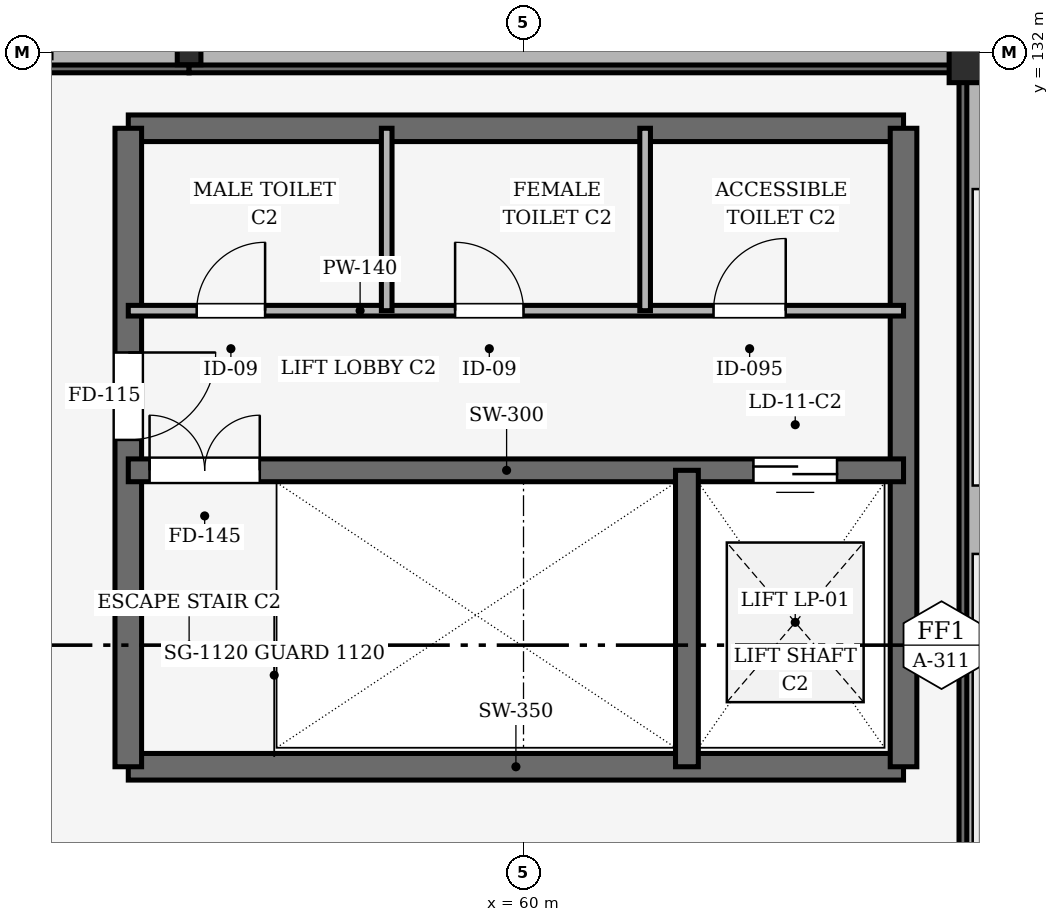
"""IFC4 building model, lengths in metres.
Left out: names, types, materials, properties, quantities, classifications, styles, units other than length and angle.
Written with IfcOpenShell. Run it as: python <this file> out.ifc"""

import sys

from ifc_helpers import new_model, si_unit, direction, frame, frame_2d, origin, origin_2d, place, context, subcontext, project, spatial, rectangle, i_section, extrude, element, fill, save


model = new_model("IFC4")
c1 = context("Model", 3, precision=1e-05, world=origin(), true_north=direction((0.0, 1.0)))
c2 = subcontext(c1, "Body", "Model", "MODEL_VIEW")
j1 = project(units=[si_unit("LENGTHUNIT", "METRE"), si_unit("PLANEANGLEUNIT", "RADIAN")], contexts=[c1])
p1 = place(None, origin())
s1 = spatial("IfcSite", under=j1, at=p1, CompositionType="ELEMENT")
p2 = place(p1, origin())
s2 = spatial("IfcBuilding", under=s1, at=p2, CompositionType="ELEMENT")
p3 = place(p2, frame((0.0, 0.0, 10.8)))
s3 = spatial("IfcBuildingStorey", under=s2, at=p3, CompositionType="ELEMENT", Elevation=10.8)
p4 = place(p3, frame((66.0, 132.0, 0.0), z_axis=(0.0, 0.0, 1.0), x_axis=(1.0, 0.0, 0.0)))
e1 = element("IfcColumn", 1, at=p4, inside=s3, PredefinedType="COLUMN", context=c2, shape_type="SweptSolid", body=[
    extrude(rectangle(XDim=0.8, YDim=0.8, at=origin_2d()), origin(), (0.0, 0.0, 1.0), 8.5),
])
p5 = place(p3, frame((55.6, 132.0, 0.0), z_axis=(0.0, 0.0, 1.0), x_axis=(1.0, 0.0, 0.0)))
e2 = element("IfcColumn", 2, at=p5, inside=s3, PredefinedType="COLUMN", context=c2, shape_type="SweptSolid", body=[
    extrude(i_section(OverallWidth=0.311, OverallDepth=0.327, WebThickness=0.016, FlangeThickness=0.025, FilletRadius=0.015, at=origin_2d()), origin(), (0.0, 0.0, 1.0), 6.7),
])
p6 = place(p3, frame((66.0, 120.0, 0.0), z_axis=(0.0, 0.0, 1.0), x_axis=(0.0, 1.0, 0.0)))
e3 = element("IfcWall", 3, at=p6, inside=s3, PredefinedType="SOLIDWALL", context=c2, shape_type="SweptSolid", body=[
    extrude(rectangle(XDim=12.0, YDim=0.54, at=frame_2d((6.0, 0.0))), origin(), (0.0, 0.0, 1.0), 4.6),
])
p7 = place(p3, frame((55.6, 132.0, 0.0), z_axis=(0.0, 0.0, 1.0), x_axis=(-1.0, 0.0, 0.0)))
e4 = element("IfcWall", 4, at=p7, inside=s3, PredefinedType="SOLIDWALL", context=c2, shape_type="SweptSolid", body=[
    extrude(rectangle(XDim=33.2, YDim=0.54, at=frame_2d((16.6, 0.0))), origin(), (0.0, 0.0, 1.0), 1.25),
])
p8 = place(p3, frame((66.0, 132.0, 0.0), z_axis=(0.0, 0.0, 1.0), x_axis=(-1.0, 0.0, 0.0)))
e5 = element("IfcWall", 5, at=p8, inside=s3, PredefinedType="SOLIDWALL", context=c2, shape_type="SweptSolid", body=[
    extrude(rectangle(XDim=10.4, YDim=0.54, at=frame_2d((5.2, 0.0))), origin(), (0.0, 0.0, 1.0), 8.4),
])
p9 = place(p3, frame((66.0, 120.0, 7.0), z_axis=(0.0, 0.0, 1.0), x_axis=(0.0, 1.0, 0.0)))
e6 = element("IfcWall", 6, at=p9, inside=s3, PredefinedType="SOLIDWALL", context=c2, shape_type="SweptSolid", body=[
    extrude(rectangle(XDim=12.0, YDim=0.335, at=frame_2d((6.0, 0.0))), origin(), (0.0, 0.0, 1.0), 3.85),
])
p10 = place(p3, frame((55.6, 132.0, 8.4), z_axis=(0.0, 0.0, 1.0), x_axis=(1.0, 0.0, 0.0)))
e7 = element("IfcWall", 7, at=p10, inside=s3, PredefinedType="SOLIDWALL", context=c2, shape_type="SweptSolid", body=[
    extrude(rectangle(XDim=10.4, YDim=0.335, at=frame_2d((5.2, 0.0))), origin(), (0.0, 0.0, 1.0), 2.526),
])
p11 = place(p3, frame((22.4, 132.0, 6.65), z_axis=(0.0, 0.0, 1.0), x_axis=(1.0, 0.0, 0.0)))
e8 = element("IfcWall", 8, at=p11, inside=s3, PredefinedType="SOLIDWALL", context=c2, shape_type="SweptSolid", body=[
    extrude(rectangle(XDim=33.2, YDim=0.335, at=frame_2d((16.6, 0.0))), origin(), (0.0, 0.0, 1.0), 3.35),
])
for number, where, z_axis, x_axis in (
    (9, (54.8, 122.6, 0.0), (0.0, 0.0, 1.0), (1.0, 0.0, 0.0)),
    (10, (65.0, 131.0, 0.0), (0.0, 0.0, 1.0), (-1.0, 0.0, 0.0)),
):
    element("IfcWall", number, at=place(p3, frame(where, z_axis=z_axis, x_axis=x_axis)), inside=s3, PredefinedType="SHEAR", context=c2, shape_type="SweptSolid", body=[
        extrude(rectangle(XDim=10.2, YDim=0.35, at=frame_2d((5.1, 0.0))), origin(), (0.0, 0.0, 1.0), 5.4),
    ])
p12 = place(p3, frame((54.8, 131.0, 0.0), z_axis=(0.0, 0.0, 1.0), x_axis=(0.0, -1.0, 0.0)))
e11 = element("IfcWall", 11, at=p12, inside=s3, PredefinedType="SHEAR", context=c2, shape_type="SweptSolid", body=[
    extrude(rectangle(XDim=8.4, YDim=0.35, at=frame_2d((4.2, 0.0))), origin(), (0.0, 0.0, 1.0), 5.4),
])
p13 = place(p12, frame((2.95, 0.0, 0.0)))
e12 = element("IfcOpeningElement", 12, at=p13, cuts=e11, PredefinedType="OPENING", context=c2, shape_type="SweptSolid", body=[
    extrude(rectangle(XDim=1.15, YDim=2.15, at=frame_2d((0.575, 1.075))), frame((0.0, 0.185, 0.0), z_axis=(0.0, -1.0, 0.0), x_axis=(1.0, 0.0, 0.0)), (0.0, 0.0, 1.0), 0.37),
])
p14 = place(p3, frame((65.0, 122.6, 0.0), z_axis=(0.0, 0.0, 1.0), x_axis=(0.0, 1.0, 0.0)))
e13 = element("IfcWall", 13, at=p14, inside=s3, PredefinedType="SHEAR", context=c2, shape_type="SweptSolid", body=[
    extrude(rectangle(XDim=8.4, YDim=0.35, at=frame_2d((4.2, 0.0))), origin(), (0.0, 0.0, 1.0), 5.4),
])
p15 = place(p3, frame((54.8, 126.5, 0.0), z_axis=(0.0, 0.0, 1.0), x_axis=(1.0, 0.0, 0.0)))
e14 = element("IfcWall", 14, at=p15, inside=s3, PredefinedType="SHEAR", context=c2, shape_type="SweptSolid", body=[
    extrude(rectangle(XDim=10.2, YDim=0.3, at=frame_2d((5.1, 0.0))), origin(), (0.0, 0.0, 1.0), 5.4),
])
p16 = place(p15, frame((0.28, 0.0, 0.0)))
e15 = element("IfcOpeningElement", 15, at=p16, cuts=e14, PredefinedType="OPENING", context=c2, shape_type="SweptSolid", body=[
    extrude(rectangle(XDim=1.45, YDim=2.15, at=frame_2d((0.725, 1.075))), frame((0.0, 0.16, 0.0), z_axis=(0.0, -1.0, 0.0), x_axis=(1.0, 0.0, 0.0)), (0.0, 0.0, 1.0), 0.32),
])
p17 = place(p15, frame((8.225, 0.0, 0.0)))
e16 = element("IfcOpeningElement", 16, at=p17, cuts=e14, PredefinedType="OPENING", context=c2, shape_type="SweptSolid", body=[
    extrude(rectangle(XDim=1.1, YDim=2.15, at=frame_2d((0.55, 1.075))), frame((0.0, 0.16, 0.0), z_axis=(0.0, -1.0, 0.0), x_axis=(1.0, 0.0, 0.0)), (0.0, 0.0, 1.0), 0.32),
])
p18 = place(p3, frame((62.15, 122.6, 0.0), z_axis=(0.0, 0.0, 1.0), x_axis=(0.0, 1.0, 0.0)))
e17 = element("IfcWall", 17, at=p18, inside=s3, PredefinedType="SHEAR", context=c2, shape_type="SweptSolid", body=[
    extrude(rectangle(XDim=3.9, YDim=0.3, at=frame_2d((1.95, 0.0))), origin(), (0.0, 0.0, 1.0), 5.4),
])
p19 = place(p3, frame((54.8, 128.6, 0.0), z_axis=(0.0, 0.0, 1.0), x_axis=(1.0, 0.0, 0.0)))
e18 = element("IfcWall", 18, at=p19, inside=s3, PredefinedType="PARTITIONING", context=c2, shape_type="SweptSolid", body=[
    extrude(rectangle(XDim=10.2, YDim=0.14, at=frame_2d((5.1, 0.0))), origin(), (0.0, 0.0, 1.0), 4.5),
])
p20 = place(p19, frame((0.9, 0.0, 0.0)))
e19 = element("IfcOpeningElement", 19, at=p20, cuts=e18, PredefinedType="OPENING", context=c2, shape_type="SweptSolid", body=[
    extrude(rectangle(XDim=0.9, YDim=2.1, at=frame_2d((0.45, 1.05))), frame((0.0, 0.08, 0.0), z_axis=(0.0, -1.0, 0.0), x_axis=(1.0, 0.0, 0.0)), (0.0, 0.0, 1.0), 0.16),
])
p21 = place(p19, frame((4.3, 0.0, 0.0)))
e20 = element("IfcOpeningElement", 20, at=p21, cuts=e18, PredefinedType="OPENING", context=c2, shape_type="SweptSolid", body=[
    extrude(rectangle(XDim=0.9, YDim=2.1, at=frame_2d((0.45, 1.05))), frame((0.0, 0.08, 0.0), z_axis=(0.0, -1.0, 0.0), x_axis=(1.0, 0.0, 0.0)), (0.0, 0.0, 1.0), 0.16),
])
p22 = place(p19, frame((7.7, 0.0, 0.0)))
e21 = element("IfcOpeningElement", 21, at=p22, cuts=e18, PredefinedType="OPENING", context=c2, shape_type="SweptSolid", body=[
    extrude(rectangle(XDim=0.95, YDim=2.1, at=frame_2d((0.475, 1.05))), frame((0.0, 0.08, 0.0), z_axis=(0.0, -1.0, 0.0), x_axis=(1.0, 0.0, 0.0)), (0.0, 0.0, 1.0), 0.16),
])
for number, where, z_axis, x_axis in (
    (22, (58.2, 128.6, 0.0), (0.0, 0.0, 1.0), (0.0, 1.0, 0.0)),
    (23, (61.6, 128.6, 0.0), (0.0, 0.0, 1.0), (0.0, 1.0, 0.0)),
):
    element("IfcWall", number, at=place(p3, frame(where, z_axis=z_axis, x_axis=x_axis)), inside=s3, PredefinedType="PARTITIONING", context=c2, shape_type="SweptSolid", body=[
        extrude(rectangle(XDim=2.4, YDim=0.14, at=frame_2d((1.2, 0.0))), origin(), (0.0, 0.0, 1.0), 4.5),
    ])
p23 = place(p13, origin())
e24 = element("IfcDoor", 24, at=p23, inside=s3, OperationType="SINGLE_SWING_LEFT", PredefinedType="DOOR", context=c2, shape_type="SweptSolid", body=[
    extrude(rectangle(XDim=1.15, YDim=2.15, at=frame_2d((0.575, 1.075))), frame((0.0, 0.025, 0.0), z_axis=(0.0, -1.0, 0.0), x_axis=(1.0, 0.0, 0.0)), (0.0, 0.0, 1.0), 0.05),
])
fill(e12, e24)
p24 = place(p16, origin())
e25 = element("IfcDoor", 25, at=p24, inside=s3, OperationType="DOUBLE_DOOR_SINGLE_SWING", PredefinedType="DOOR", context=c2, shape_type="SweptSolid", body=[
    extrude(rectangle(XDim=1.45, YDim=2.15, at=frame_2d((0.725, 1.075))), frame((0.0, 0.025, 0.0), z_axis=(0.0, -1.0, 0.0), x_axis=(1.0, 0.0, 0.0)), (0.0, 0.0, 1.0), 0.05),
])
fill(e15, e25)
p25 = place(p17, origin())
e26 = element("IfcDoor", 26, at=p25, inside=s3, OperationType="DOUBLE_DOOR_SLIDING", PredefinedType="DOOR", context=c2, shape_type="SweptSolid", body=[
    extrude(rectangle(XDim=1.1, YDim=2.15, at=frame_2d((0.55, 1.075))), frame((0.0, 0.025, 0.0), z_axis=(0.0, -1.0, 0.0), x_axis=(1.0, 0.0, 0.0)), (0.0, 0.0, 1.0), 0.05),
])
fill(e16, e26)
p26 = place(p20, origin())
e27 = element("IfcDoor", 27, at=p26, inside=s3, OperationType="SINGLE_SWING_RIGHT", PredefinedType="DOOR", context=c2, shape_type="SweptSolid", body=[
    extrude(rectangle(XDim=0.9, YDim=2.1, at=frame_2d((0.45, 1.05))), frame((0.0, 0.025, 0.0), z_axis=(0.0, -1.0, 0.0), x_axis=(1.0, 0.0, 0.0)), (0.0, 0.0, 1.0), 0.05),
])
fill(e19, e27)
p27 = place(p21, origin())
e28 = element("IfcDoor", 28, at=p27, inside=s3, OperationType="SINGLE_SWING_LEFT", PredefinedType="DOOR", context=c2, shape_type="SweptSolid", body=[
    extrude(rectangle(XDim=0.9, YDim=2.1, at=frame_2d((0.45, 1.05))), frame((0.0, 0.025, 0.0), z_axis=(0.0, -1.0, 0.0), x_axis=(1.0, 0.0, 0.0)), (0.0, 0.0, 1.0), 0.05),
])
fill(e20, e28)
p28 = place(p22, origin())
e29 = element("IfcDoor", 29, at=p28, inside=s3, OperationType="SINGLE_SWING_RIGHT", PredefinedType="DOOR", context=c2, shape_type="SweptSolid", body=[
    extrude(rectangle(XDim=0.95, YDim=2.1, at=frame_2d((0.475, 1.05))), frame((0.0, 0.025, 0.0), z_axis=(0.0, -1.0, 0.0), x_axis=(1.0, 0.0, 0.0)), (0.0, 0.0, 1.0), 0.05),
])
fill(e21, e29)
save(model, sys.argv[1])
